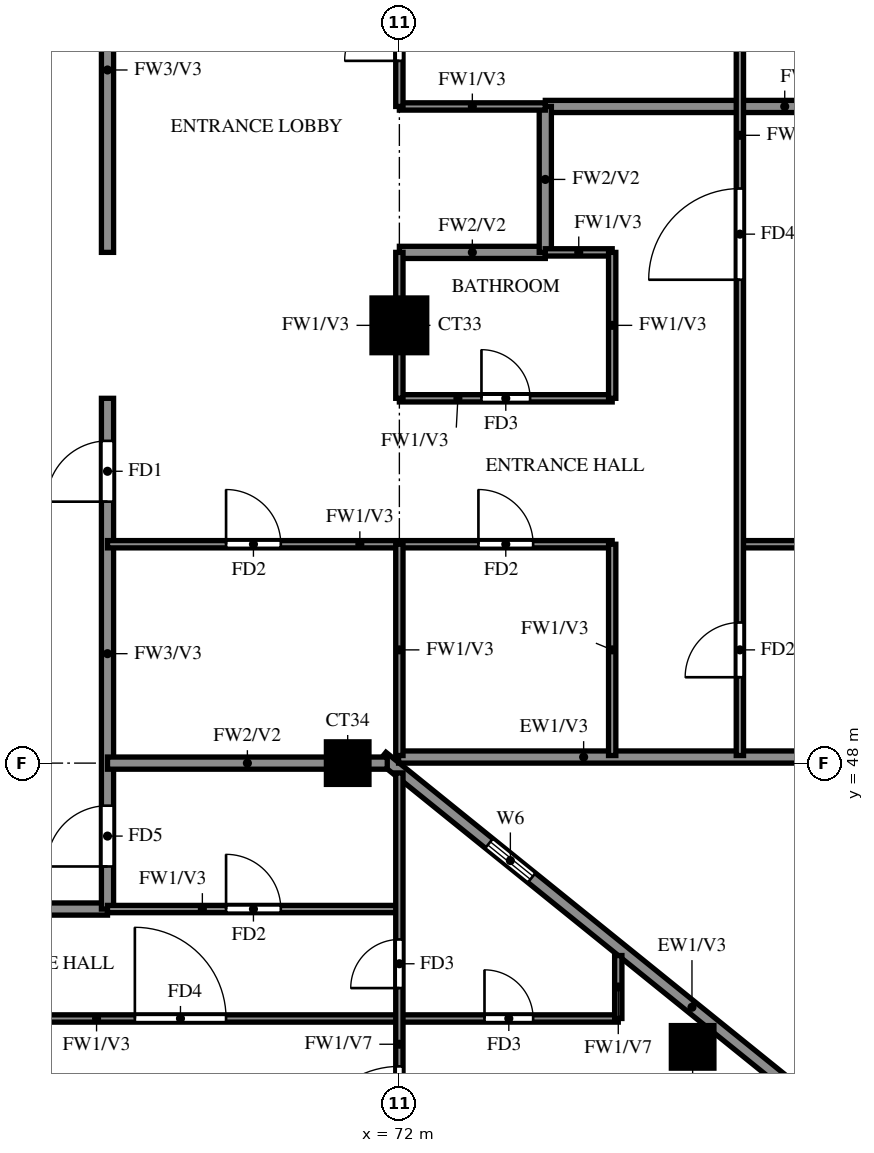
"""IFC4 building model, lengths in metres.
Left out: names, types, materials, properties, quantities, classifications, styles, units other than length and angle.
Written with IfcOpenShell. Run it as: python <this file> out.ifc"""

import sys

from ifc_helpers import new_model, si_unit, direction, frame, frame_2d, origin, origin_2d, place, context, subcontext, project, spatial, rectangle, extrude, source, transform, mapped, element, fill, save


model = new_model("IFC4")
c1 = context("Model", 3, precision=1e-05, world=origin(), true_north=direction((0.0, 1.0)))
c2 = subcontext(c1, "Body", "Model", "MODEL_VIEW")
j1 = project(units=[si_unit("LENGTHUNIT", "METRE"), si_unit("PLANEANGLEUNIT", "RADIAN")], contexts=[c1])
p1 = place(None, origin())
s1 = spatial("IfcSite", under=j1, at=p1, CompositionType="ELEMENT")
p2 = place(p1, origin())
s2 = spatial("IfcBuilding", under=s1, at=p2, CompositionType="ELEMENT")
p3 = place(p2, frame((0.0, 0.0, 218.5)))
s3 = spatial("IfcBuildingStorey", under=s2, at=p3, CompositionType="ELEMENT", Elevation=218.5)
m1 = source(origin(), c2, "Body", "SweptSolid", [
    extrude(rectangle(XDim=0.7, YDim=0.7, at=origin_2d()), origin(), (0.0, 0.0, 1.0), 3.22),
])
for number, where, z_axis, x_axis in (
    (1, (76.823, 43.333, 0.0), (0.0, 0.0, 1.0), (1.0, 0.0, 0.0)),
    (2, (71.15, 48.0, 0.0), (0.0, 0.0, 1.0), (1.0, 0.0, 0.0)),
):
    element("IfcColumn", number, at=place(p3, frame(where, z_axis=z_axis, x_axis=x_axis)), inside=s3, PredefinedType="COLUMN", context=c2, shape_type="MappedRepresentation", body=[
        mapped(m1, transform((0.0, 0.0, 0.0))),
    ])
m2 = source(origin(), c2, "Body", "SweptSolid", [
    extrude(rectangle(XDim=0.9, YDim=0.9, at=origin_2d()), origin(), (0.0, 0.0, 1.0), 3.22),
])
p4 = place(p3, frame((72.0, 55.2, 0.0), z_axis=(0.0, 0.0, 1.0), x_axis=(1.0, 0.0, 0.0)))
e3 = element("IfcColumn", 3, at=p4, inside=s3, PredefinedType="COLUMN", context=c2, shape_type="MappedRepresentation", body=[
    mapped(m2, transform((0.0, 0.0, 0.0))),
])
p5 = place(p3, frame((81.907, 39.87, 0.0), z_axis=(0.0, 0.0, 1.0), x_axis=(-0.777936274417, 0.62834318087, 0.0)))
e4 = element("IfcWall", 4, at=p5, inside=s3, PredefinedType="SOLIDWALL", context=c2, shape_type="SweptSolid", body=[
    extrude(rectangle(XDim=13.099, YDim=0.2, at=frame_2d((6.549, 0.0))), origin(), (0.0, 0.0, 1.0), 3.22),
])
p6 = place(p5, frame((9.938, 0.0, 1.5)))
e5 = element("IfcOpeningElement", 5, at=p6, cuts=e4, PredefinedType="OPENING", context=c2, shape_type="SweptSolid", body=[
    extrude(rectangle(XDim=0.9, YDim=0.9, at=frame_2d((0.45, 0.45))), frame((0.0, 0.11, 0.0), z_axis=(0.0, -1.0, 0.0), x_axis=(1.0, 0.0, 0.0)), (0.0, 0.0, 1.0), 0.22),
])
p7 = place(p3, frame((71.987, 48.1, 0.0), z_axis=(0.0, 0.0, 1.0), x_axis=(1.0, 0.0, 0.0)))
e6 = element("IfcWall", 6, at=p7, inside=s3, PredefinedType="SOLIDWALL", context=c2, shape_type="SweptSolid", body=[
    extrude(rectangle(XDim=6.763, YDim=0.2, at=frame_2d((3.381, 0.0))), origin(), (0.0, 0.0, 1.0), 3.22),
])
p8 = place(p3, frame((60.0, 45.6, 0.0), z_axis=(0.0, 0.0, 1.0), x_axis=(1.0, 0.0, 0.0)))
e7 = element("IfcWall", 7, at=p8, inside=s3, PredefinedType="SOLIDWALL", context=c2, shape_type="SweptSolid", body=[
    extrude(rectangle(XDim=7.2, YDim=0.2, at=frame_2d((3.6, 0.0))), origin(), (0.0, 0.0, 1.0), 3.22),
])
p9 = place(p3, frame((67.2, 45.6, 0.0), z_axis=(0.0, 0.0, 1.0), x_axis=(0.0, 1.0, 0.0)))
e8 = element("IfcWall", 8, at=p9, inside=s3, PredefinedType="SOLIDWALL", context=c2, shape_type="SweptSolid", body=[
    extrude(rectangle(XDim=8.4, YDim=0.2, at=frame_2d((4.2, 0.0))), origin(), (0.0, 0.0, 1.0), 3.22),
])
p10 = place(p9, frame((6.7, 0.0, 0.0)))
e9 = element("IfcOpeningElement", 9, at=p10, cuts=e8, PredefinedType="OPENING", context=c2, shape_type="SweptSolid", body=[
    extrude(rectangle(XDim=1.0, YDim=2.1, at=frame_2d((0.5, 1.05))), frame((0.0, 0.11, 0.0), z_axis=(0.0, -1.0, 0.0), x_axis=(1.0, 0.0, 0.0)), (0.0, 0.0, 1.0), 0.22),
])
p11 = place(p9, frame((0.7, 0.0, 0.0)))
e10 = element("IfcOpeningElement", 10, at=p11, cuts=e8, PredefinedType="OPENING", context=c2, shape_type="SweptSolid", body=[
    extrude(rectangle(XDim=1.0, YDim=2.1, at=frame_2d((0.5, 1.05))), frame((0.0, 0.11, 0.0), z_axis=(0.0, -1.0, 0.0), x_axis=(1.0, 0.0, 0.0)), (0.0, 0.0, 1.0), 0.22),
])
p12 = place(p3, frame((67.2, 56.4, 0.0), z_axis=(0.0, 0.0, 1.0), x_axis=(0.0, 1.0, 0.0)))
e11 = element("IfcWall", 11, at=p12, inside=s3, PredefinedType="SOLIDWALL", context=c2, shape_type="SweptSolid", body=[
    extrude(rectangle(XDim=6.0, YDim=0.2, at=frame_2d((3.0, 0.0))), origin(), (0.0, 0.0, 1.0), 3.22),
])
p13 = place(p12, frame((3.7, 0.0, 0.0)))
e12 = element("IfcOpeningElement", 12, at=p13, cuts=e11, PredefinedType="OPENING", context=c2, shape_type="SweptSolid", body=[
    extrude(rectangle(XDim=1.0, YDim=2.1, at=frame_2d((0.5, 1.05))), frame((0.0, 0.11, 0.0), z_axis=(0.0, -1.0, 0.0), x_axis=(1.0, 0.0, 0.0)), (0.0, 0.0, 1.0), 0.22),
])
p14 = place(p3, frame((67.2, 48.0, 0.0), z_axis=(0.0, 0.0, 1.0), x_axis=(1.0, 0.0, 0.0)))
e13 = element("IfcWall", 13, at=p14, inside=s3, PredefinedType="SOLIDWALL", context=c2, shape_type="SweptSolid", body=[
    extrude(rectangle(XDim=4.601, YDim=0.2, at=frame_2d((2.301, 0.0))), origin(), (0.0, 0.0, 1.0), 3.22),
])
p15 = place(p3, frame((72.0, 56.4, 0.0), z_axis=(0.0, 0.0, 1.0), x_axis=(1.0, 0.0, 0.0)))
e14 = element("IfcWall", 14, at=p15, inside=s3, PredefinedType="SOLIDWALL", context=c2, shape_type="SweptSolid", body=[
    extrude(rectangle(XDim=2.4, YDim=0.2, at=frame_2d((1.2, 0.0))), origin(), (0.0, 0.0, 1.0), 3.22),
])
p16 = place(p3, frame((74.4, 58.8, 0.0), z_axis=(0.0, 0.0, 1.0), x_axis=(1.0, 0.0, 0.0)))
e15 = element("IfcWall", 15, at=p16, inside=s3, PredefinedType="SOLIDWALL", context=c2, shape_type="SweptSolid", body=[
    extrude(rectangle(XDim=7.875, YDim=0.2, at=frame_2d((3.938, 0.0))), origin(), (0.0, 0.0, 1.0), 2.32),
])
p17 = place(p3, frame((74.4, 56.4, 0.0), z_axis=(0.0, 0.0, 1.0), x_axis=(0.0, 1.0, 0.0)))
e16 = element("IfcWall", 16, at=p17, inside=s3, PredefinedType="SOLIDWALL", context=c2, shape_type="SweptSolid", body=[
    extrude(rectangle(XDim=2.4, YDim=0.2, at=frame_2d((1.2, 0.0))), origin(), (0.0, 0.0, 1.0), 3.22),
])
p18 = place(p3, frame((60.0, 43.8, 0.0), z_axis=(0.0, 0.0, 1.0), x_axis=(1.0, 0.0, 0.0)))
e17 = element("IfcWall", 17, at=p18, inside=s3, PredefinedType="PARTITIONING", context=c2, shape_type="SweptSolid", body=[
    extrude(rectangle(XDim=15.6, YDim=0.12, at=frame_2d((7.8, 0.0))), origin(), (0.0, 0.0, 1.0), 3.22),
])
p19 = place(p18, frame((7.65, 0.0, 0.0)))
e18 = element("IfcOpeningElement", 18, at=p19, cuts=e17, PredefinedType="OPENING", context=c2, shape_type="SweptSolid", body=[
    extrude(rectangle(XDim=1.5, YDim=2.1, at=frame_2d((0.75, 1.05))), frame((0.0, 0.07, 0.0), z_axis=(0.0, -1.0, 0.0), x_axis=(1.0, 0.0, 0.0)), (0.0, 0.0, 1.0), 0.14),
])
p20 = place(p18, frame((1.95, 0.0, 0.0)))
e19 = element("IfcOpeningElement", 19, at=p20, cuts=e17, PredefinedType="OPENING", context=c2, shape_type="SweptSolid", body=[
    extrude(rectangle(XDim=0.9, YDim=2.1, at=frame_2d((0.45, 1.05))), frame((0.0, 0.07, 0.0), z_axis=(0.0, -1.0, 0.0), x_axis=(1.0, 0.0, 0.0)), (0.0, 0.0, 1.0), 0.14),
])
p21 = place(p18, frame((13.4, 0.0, 0.0)))
e20 = element("IfcOpeningElement", 20, at=p21, cuts=e17, PredefinedType="OPENING", context=c2, shape_type="SweptSolid", body=[
    extrude(rectangle(XDim=0.8, YDim=2.1, at=frame_2d((0.4, 1.05))), frame((0.0, 0.07, 0.0), z_axis=(0.0, -1.0, 0.0), x_axis=(1.0, 0.0, 0.0)), (0.0, 0.0, 1.0), 0.14),
])
p22 = place(p3, frame((67.2, 45.6, 0.0), z_axis=(0.0, 0.0, 1.0), x_axis=(1.0, 0.0, 0.0)))
e21 = element("IfcWall", 21, at=p22, inside=s3, PredefinedType="PARTITIONING", context=c2, shape_type="SweptSolid", body=[
    extrude(rectangle(XDim=4.8, YDim=0.12, at=frame_2d((2.4, 0.0))), origin(), (0.0, 0.0, 1.0), 3.22),
])
p23 = place(p22, frame((1.95, 0.0, 0.0)))
e22 = element("IfcOpeningElement", 22, at=p23, cuts=e21, PredefinedType="OPENING", context=c2, shape_type="SweptSolid", body=[
    extrude(rectangle(XDim=0.9, YDim=2.1, at=frame_2d((0.45, 1.05))), frame((0.0, 0.07, 0.0), z_axis=(0.0, -1.0, 0.0), x_axis=(1.0, 0.0, 0.0)), (0.0, 0.0, 1.0), 0.14),
])
p24 = place(p3, frame((67.2, 51.6, 0.0), z_axis=(0.0, 0.0, 1.0), x_axis=(1.0, 0.0, 0.0)))
e23 = element("IfcWall", 23, at=p24, inside=s3, PredefinedType="PARTITIONING", context=c2, shape_type="SweptSolid", body=[
    extrude(rectangle(XDim=8.3, YDim=0.12, at=frame_2d((4.15, 0.0))), origin(), (0.0, 0.0, 1.0), 3.22),
])
p25 = place(p24, frame((6.1, 0.0, 0.0)))
e24 = element("IfcOpeningElement", 24, at=p25, cuts=e23, PredefinedType="OPENING", context=c2, shape_type="SweptSolid", body=[
    extrude(rectangle(XDim=0.9, YDim=2.1, at=frame_2d((0.45, 1.05))), frame((0.0, 0.07, 0.0), z_axis=(0.0, -1.0, 0.0), x_axis=(1.0, 0.0, 0.0)), (0.0, 0.0, 1.0), 0.14),
])
p26 = place(p24, frame((1.95, 0.0, 0.0)))
e25 = element("IfcOpeningElement", 25, at=p26, cuts=e23, PredefinedType="OPENING", context=c2, shape_type="SweptSolid", body=[
    extrude(rectangle(XDim=0.9, YDim=2.1, at=frame_2d((0.45, 1.05))), frame((0.0, 0.07, 0.0), z_axis=(0.0, -1.0, 0.0), x_axis=(1.0, 0.0, 0.0)), (0.0, 0.0, 1.0), 0.14),
])
p27 = place(p3, frame((77.6, 51.6, 0.0), z_axis=(0.0, 0.0, 1.0), x_axis=(1.0, 0.0, 0.0)))
e26 = element("IfcWall", 26, at=p27, inside=s3, PredefinedType="PARTITIONING", context=c2, shape_type="SweptSolid", body=[
    extrude(rectangle(XDim=4.675, YDim=0.12, at=frame_2d((2.337, 0.0))), origin(), (0.0, 0.0, 1.0), 2.32),
])
p28 = place(p3, frame((72.0, 54.0, 0.0), z_axis=(0.0, 0.0, 1.0), x_axis=(1.0, 0.0, 0.0)))
e27 = element("IfcWall", 27, at=p28, inside=s3, PredefinedType="PARTITIONING", context=c2, shape_type="SweptSolid", body=[
    extrude(rectangle(XDim=3.5, YDim=0.12, at=frame_2d((1.75, 0.0))), origin(), (0.0, 0.0, 1.0), 3.22),
])
p29 = place(p28, frame((1.35, 0.0, 0.0)))
e28 = element("IfcOpeningElement", 28, at=p29, cuts=e27, PredefinedType="OPENING", context=c2, shape_type="SweptSolid", body=[
    extrude(rectangle(XDim=0.8, YDim=2.1, at=frame_2d((0.4, 1.05))), frame((0.0, 0.07, 0.0), z_axis=(0.0, -1.0, 0.0), x_axis=(1.0, 0.0, 0.0)), (0.0, 0.0, 1.0), 0.14),
])
p30 = place(p3, frame((74.4, 56.4, 0.0), z_axis=(0.0, 0.0, 1.0), x_axis=(1.0, 0.0, 0.0)))
e29 = element("IfcWall", 29, at=p30, inside=s3, PredefinedType="PARTITIONING", context=c2, shape_type="SweptSolid", body=[
    extrude(rectangle(XDim=1.1, YDim=0.12, at=frame_2d((0.55, 0.0))), origin(), (0.0, 0.0, 1.0), 3.22),
])
p31 = place(p3, frame((72.0, 58.8, 0.0), z_axis=(0.0, 0.0, 1.0), x_axis=(1.0, 0.0, 0.0)))
e30 = element("IfcWall", 30, at=p31, inside=s3, PredefinedType="PARTITIONING", context=c2, shape_type="SweptSolid", body=[
    extrude(rectangle(XDim=2.4, YDim=0.12, at=frame_2d((1.2, 0.0))), origin(), (0.0, 0.0, 1.0), 3.22),
])
p32 = place(p3, frame((72.0, 39.725, 0.0), z_axis=(0.0, 0.0, 1.0), x_axis=(0.0, 1.0, 0.0)))
e31 = element("IfcWall", 31, at=p32, inside=s3, PredefinedType="PARTITIONING", context=c2, shape_type="SweptSolid", body=[
    extrude(rectangle(XDim=8.114, YDim=0.12, at=frame_2d((4.057, 0.0))), origin(), (0.0, 0.0, 1.0), 2.32),
])
p33 = place(p32, frame((1.788, 0.0, 0.0)))
e32 = element("IfcOpeningElement", 32, at=p33, cuts=e31, PredefinedType="OPENING", context=c2, shape_type="SweptSolid", body=[
    extrude(rectangle(XDim=1.5, YDim=2.1, at=frame_2d((0.75, 1.05))), frame((0.0, 0.07, 0.0), z_axis=(0.0, -1.0, 0.0), x_axis=(1.0, 0.0, 0.0)), (0.0, 0.0, 1.0), 0.14),
])
p34 = place(p32, frame((4.575, 0.0, 0.0)))
e33 = element("IfcOpeningElement", 33, at=p34, cuts=e31, PredefinedType="OPENING", context=c2, shape_type="SweptSolid", body=[
    extrude(rectangle(XDim=0.8, YDim=2.1, at=frame_2d((0.4, 1.05))), frame((0.0, 0.07, 0.0), z_axis=(0.0, -1.0, 0.0), x_axis=(1.0, 0.0, 0.0)), (0.0, 0.0, 1.0), 0.14),
])
p35 = place(p3, frame((72.0, 48.125, 0.0), z_axis=(0.0, 0.0, 1.0), x_axis=(0.0, 1.0, 0.0)))
e34 = element("IfcWall", 34, at=p35, inside=s3, PredefinedType="PARTITIONING", context=c2, shape_type="SweptSolid", body=[
    extrude(rectangle(XDim=3.475, YDim=0.12, at=frame_2d((1.738, 0.0))), origin(), (0.0, 0.0, 1.0), 3.22),
])
p36 = place(p3, frame((72.0, 54.0, 0.0), z_axis=(0.0, 0.0, 1.0), x_axis=(0.0, 1.0, 0.0)))
e35 = element("IfcWall", 35, at=p36, inside=s3, PredefinedType="PARTITIONING", context=c2, shape_type="SweptSolid", body=[
    extrude(rectangle(XDim=2.4, YDim=0.12, at=frame_2d((1.2, 0.0))), origin(), (0.0, 0.0, 1.0), 3.22),
])
p37 = place(p3, frame((72.0, 58.8, 0.0), z_axis=(0.0, 0.0, 1.0), x_axis=(0.0, 1.0, 0.0)))
e36 = element("IfcWall", 36, at=p37, inside=s3, PredefinedType="PARTITIONING", context=c2, shape_type="SweptSolid", body=[
    extrude(rectangle(XDim=3.6, YDim=0.12, at=frame_2d((1.8, 0.0))), origin(), (0.0, 0.0, 1.0), 3.22),
])
p38 = place(p37, frame((0.75, 0.0, 0.0)))
e37 = element("IfcOpeningElement", 37, at=p38, cuts=e36, PredefinedType="OPENING", context=c2, shape_type="SweptSolid", body=[
    extrude(rectangle(XDim=0.9, YDim=2.1, at=frame_2d((0.45, 1.05))), frame((0.0, 0.07, 0.0), z_axis=(0.0, -1.0, 0.0), x_axis=(1.0, 0.0, 0.0)), (0.0, 0.0, 1.0), 0.14),
])
p39 = place(p3, frame((75.5, 48.125, 0.0), z_axis=(0.0, 0.0, 1.0), x_axis=(0.0, 1.0, 0.0)))
e38 = element("IfcWall", 38, at=p39, inside=s3, PredefinedType="PARTITIONING", context=c2, shape_type="SweptSolid", body=[
    extrude(rectangle(XDim=3.475, YDim=0.12, at=frame_2d((1.738, 0.0))), origin(), (0.0, 0.0, 1.0), 3.22),
])
p40 = place(p3, frame((75.5, 54.0, 0.0), z_axis=(0.0, 0.0, 1.0), x_axis=(0.0, 1.0, 0.0)))
e39 = element("IfcWall", 39, at=p40, inside=s3, PredefinedType="PARTITIONING", context=c2, shape_type="SweptSolid", body=[
    extrude(rectangle(XDim=2.4, YDim=0.12, at=frame_2d((1.2, 0.0))), origin(), (0.0, 0.0, 1.0), 3.22),
])
p41 = place(p3, frame((75.6, 43.8, 0.0), z_axis=(0.0, 0.0, 1.0), x_axis=(0.0, 1.0, 0.0)))
e40 = element("IfcWall", 40, at=p41, inside=s3, PredefinedType="PARTITIONING", context=c2, shape_type="SweptSolid", body=[
    extrude(rectangle(XDim=1.035, YDim=0.12, at=frame_2d((0.518, 0.0))), origin(), (0.0, 0.0, 1.0), 2.32),
])
p42 = place(p3, frame((77.6, 48.125, 0.0), z_axis=(0.0, 0.0, 1.0), x_axis=(0.0, 1.0, 0.0)))
e41 = element("IfcWall", 41, at=p42, inside=s3, PredefinedType="PARTITIONING", context=c2, shape_type="SweptSolid", body=[
    extrude(rectangle(XDim=21.475, YDim=0.12, at=frame_2d((10.738, 0.0))), origin(), (0.0, 0.0, 1.0), 3.22),
])
p43 = place(p42, frame((1.288, 0.0, 0.0)))
e42 = element("IfcOpeningElement", 42, at=p43, cuts=e41, PredefinedType="OPENING", context=c2, shape_type="SweptSolid", body=[
    extrude(rectangle(XDim=0.9, YDim=2.1, at=frame_2d((0.45, 1.05))), frame((0.0, 0.07, 0.0), z_axis=(0.0, -1.0, 0.0), x_axis=(1.0, 0.0, 0.0)), (0.0, 0.0, 1.0), 0.14),
])
p44 = place(p42, frame((7.825, 0.0, 0.0)))
e43 = element("IfcOpeningElement", 43, at=p44, cuts=e41, PredefinedType="OPENING", context=c2, shape_type="SweptSolid", body=[
    extrude(rectangle(XDim=1.5, YDim=2.1, at=frame_2d((0.75, 1.05))), frame((0.0, 0.07, 0.0), z_axis=(0.0, -1.0, 0.0), x_axis=(1.0, 0.0, 0.0)), (0.0, 0.0, 1.0), 0.14),
])
p45 = place(p42, frame((12.025, 0.0, 0.0)))
e44 = element("IfcOpeningElement", 44, at=p45, cuts=e41, PredefinedType="OPENING", context=c2, shape_type="SweptSolid", body=[
    extrude(rectangle(XDim=0.9, YDim=2.1, at=frame_2d((0.45, 1.05))), frame((0.0, 0.07, 0.0), z_axis=(0.0, -1.0, 0.0), x_axis=(1.0, 0.0, 0.0)), (0.0, 0.0, 1.0), 0.14),
])
p46 = place(p42, frame((17.425, 0.0, 0.0)))
e45 = element("IfcOpeningElement", 45, at=p46, cuts=e41, PredefinedType="OPENING", context=c2, shape_type="SweptSolid", body=[
    extrude(rectangle(XDim=0.9, YDim=2.1, at=frame_2d((0.45, 1.05))), frame((0.0, 0.07, 0.0), z_axis=(0.0, -1.0, 0.0), x_axis=(1.0, 0.0, 0.0)), (0.0, 0.0, 1.0), 0.14),
])
p47 = place(p6, origin())
e46 = element("IfcWindow", 46, at=p47, inside=s3, PartitioningType="SINGLE_PANEL", PredefinedType="WINDOW", context=c2, shape_type="SweptSolid", body=[
    extrude(rectangle(XDim=0.9, YDim=0.9, at=frame_2d((0.45, 0.45))), frame((0.0, 0.03, 0.0), z_axis=(0.0, -1.0, 0.0), x_axis=(1.0, 0.0, 0.0)), (0.0, 0.0, 1.0), 0.06),
])
fill(e5, e46)
p48 = place(p10, origin())
e47 = element("IfcDoor", 47, at=p48, inside=s3, OperationType="SINGLE_SWING_LEFT", PredefinedType="DOOR", context=c2, shape_type="SweptSolid", body=[
    extrude(rectangle(XDim=1.0, YDim=2.1, at=frame_2d((0.5, 1.05))), frame((0.0, 0.025, 0.0), z_axis=(0.0, -1.0, 0.0), x_axis=(1.0, 0.0, 0.0)), (0.0, 0.0, 1.0), 0.05),
])
fill(e9, e47)
p49 = place(p43, origin())
e48 = element("IfcDoor", 48, at=p49, inside=s3, OperationType="SINGLE_SWING_RIGHT", PredefinedType="DOOR", context=c2, shape_type="SweptSolid", body=[
    extrude(rectangle(XDim=0.9, YDim=2.1, at=frame_2d((0.45, 1.05))), frame((0.0, 0.025, 0.0), z_axis=(0.0, -1.0, 0.0), x_axis=(1.0, 0.0, 0.0)), (0.0, 0.0, 1.0), 0.05),
])
fill(e42, e48)
p50 = place(p44, origin())
e49 = element("IfcDoor", 49, at=p50, inside=s3, OperationType="SINGLE_SWING_RIGHT", PredefinedType="DOOR", context=c2, shape_type="SweptSolid", body=[
    extrude(rectangle(XDim=1.5, YDim=2.1, at=frame_2d((0.75, 1.05))), frame((0.0, 0.025, 0.0), z_axis=(0.0, -1.0, 0.0), x_axis=(1.0, 0.0, 0.0)), (0.0, 0.0, 1.0), 0.05),
])
fill(e43, e49)
p51 = place(p25, origin())
e50 = element("IfcDoor", 50, at=p51, inside=s3, OperationType="SINGLE_SWING_LEFT", PredefinedType="DOOR", context=c2, shape_type="SweptSolid", body=[
    extrude(rectangle(XDim=0.9, YDim=2.1, at=frame_2d((0.45, 1.05))), frame((0.0, 0.025, 0.0), z_axis=(0.0, -1.0, 0.0), x_axis=(1.0, 0.0, 0.0)), (0.0, 0.0, 1.0), 0.05),
])
fill(e24, e50)
p52 = place(p29, origin())
e51 = element("IfcDoor", 51, at=p52, inside=s3, OperationType="SINGLE_SWING_RIGHT", PredefinedType="DOOR", context=c2, shape_type="SweptSolid", body=[
    extrude(rectangle(XDim=0.8, YDim=2.1, at=frame_2d((0.4, 1.05))), frame((0.0, 0.025, 0.0), z_axis=(0.0, -1.0, 0.0), x_axis=(1.0, 0.0, 0.0)), (0.0, 0.0, 1.0), 0.05),
])
fill(e28, e51)
p53 = place(p26, origin())
e52 = element("IfcDoor", 52, at=p53, inside=s3, OperationType="SINGLE_SWING_LEFT", PredefinedType="DOOR", context=c2, shape_type="SweptSolid", body=[
    extrude(rectangle(XDim=0.9, YDim=2.1, at=frame_2d((0.45, 1.05))), frame((0.0, 0.025, 0.0), z_axis=(0.0, -1.0, 0.0), x_axis=(1.0, 0.0, 0.0)), (0.0, 0.0, 1.0), 0.05),
])
fill(e25, e52)
p54 = place(p38, origin())
e53 = element("IfcDoor", 53, at=p54, inside=s3, OperationType="SINGLE_SWING_RIGHT", PredefinedType="DOOR", context=c2, shape_type="SweptSolid", body=[
    extrude(rectangle(XDim=0.9, YDim=2.1, at=frame_2d((0.45, 1.05))), frame((0.0, 0.025, 0.0), z_axis=(0.0, -1.0, 0.0), x_axis=(1.0, 0.0, 0.0)), (0.0, 0.0, 1.0), 0.05),
])
fill(e37, e53)
p55 = place(p23, origin())
e54 = element("IfcDoor", 54, at=p55, inside=s3, OperationType="SINGLE_SWING_LEFT", PredefinedType="DOOR", context=c2, shape_type="SweptSolid", body=[
    extrude(rectangle(XDim=0.9, YDim=2.1, at=frame_2d((0.45, 1.05))), frame((0.0, 0.025, 0.0), z_axis=(0.0, -1.0, 0.0), x_axis=(1.0, 0.0, 0.0)), (0.0, 0.0, 1.0), 0.05),
])
fill(e22, e54)
p56 = place(p11, origin())
e55 = element("IfcDoor", 55, at=p56, inside=s3, OperationType="SINGLE_SWING_RIGHT", PredefinedType="DOOR", context=c2, shape_type="SweptSolid", body=[
    extrude(rectangle(XDim=1.0, YDim=2.1, at=frame_2d((0.5, 1.05))), frame((0.0, 0.025, 0.0), z_axis=(0.0, -1.0, 0.0), x_axis=(1.0, 0.0, 0.0)), (0.0, 0.0, 1.0), 0.05),
])
fill(e10, e55)
p57 = place(p19, origin())
e56 = element("IfcDoor", 56, at=p57, inside=s3, OperationType="SINGLE_SWING_LEFT", PredefinedType="DOOR", context=c2, shape_type="SweptSolid", body=[
    extrude(rectangle(XDim=1.5, YDim=2.1, at=frame_2d((0.75, 1.05))), frame((0.0, 0.025, 0.0), z_axis=(0.0, -1.0, 0.0), x_axis=(1.0, 0.0, 0.0)), (0.0, 0.0, 1.0), 0.05),
])
fill(e18, e56)
p58 = place(p33, origin())
e57 = element("IfcDoor", 57, at=p58, inside=s3, OperationType="SINGLE_SWING_LEFT", PredefinedType="DOOR", context=c2, shape_type="SweptSolid", body=[
    extrude(rectangle(XDim=1.5, YDim=2.1, at=frame_2d((0.75, 1.05))), frame((0.0, 0.025, 0.0), z_axis=(0.0, -1.0, 0.0), x_axis=(1.0, 0.0, 0.0)), (0.0, 0.0, 1.0), 0.05),
])
fill(e32, e57)
p59 = place(p34, origin())
e58 = element("IfcDoor", 58, at=p59, inside=s3, OperationType="SINGLE_SWING_LEFT", PredefinedType="DOOR", context=c2, shape_type="SweptSolid", body=[
    extrude(rectangle(XDim=0.8, YDim=2.1, at=frame_2d((0.4, 1.05))), frame((0.0, 0.025, 0.0), z_axis=(0.0, -1.0, 0.0), x_axis=(1.0, 0.0, 0.0)), (0.0, 0.0, 1.0), 0.05),
])
fill(e33, e58)
p60 = place(p21, origin())
e59 = element("IfcDoor", 59, at=p60, inside=s3, OperationType="SINGLE_SWING_LEFT", PredefinedType="DOOR", context=c2, shape_type="SweptSolid", body=[
    extrude(rectangle(XDim=0.8, YDim=2.1, at=frame_2d((0.4, 1.05))), frame((0.0, 0.025, 0.0), z_axis=(0.0, -1.0, 0.0), x_axis=(1.0, 0.0, 0.0)), (0.0, 0.0, 1.0), 0.05),
])
fill(e20, e59)
save(model, sys.argv[1])
